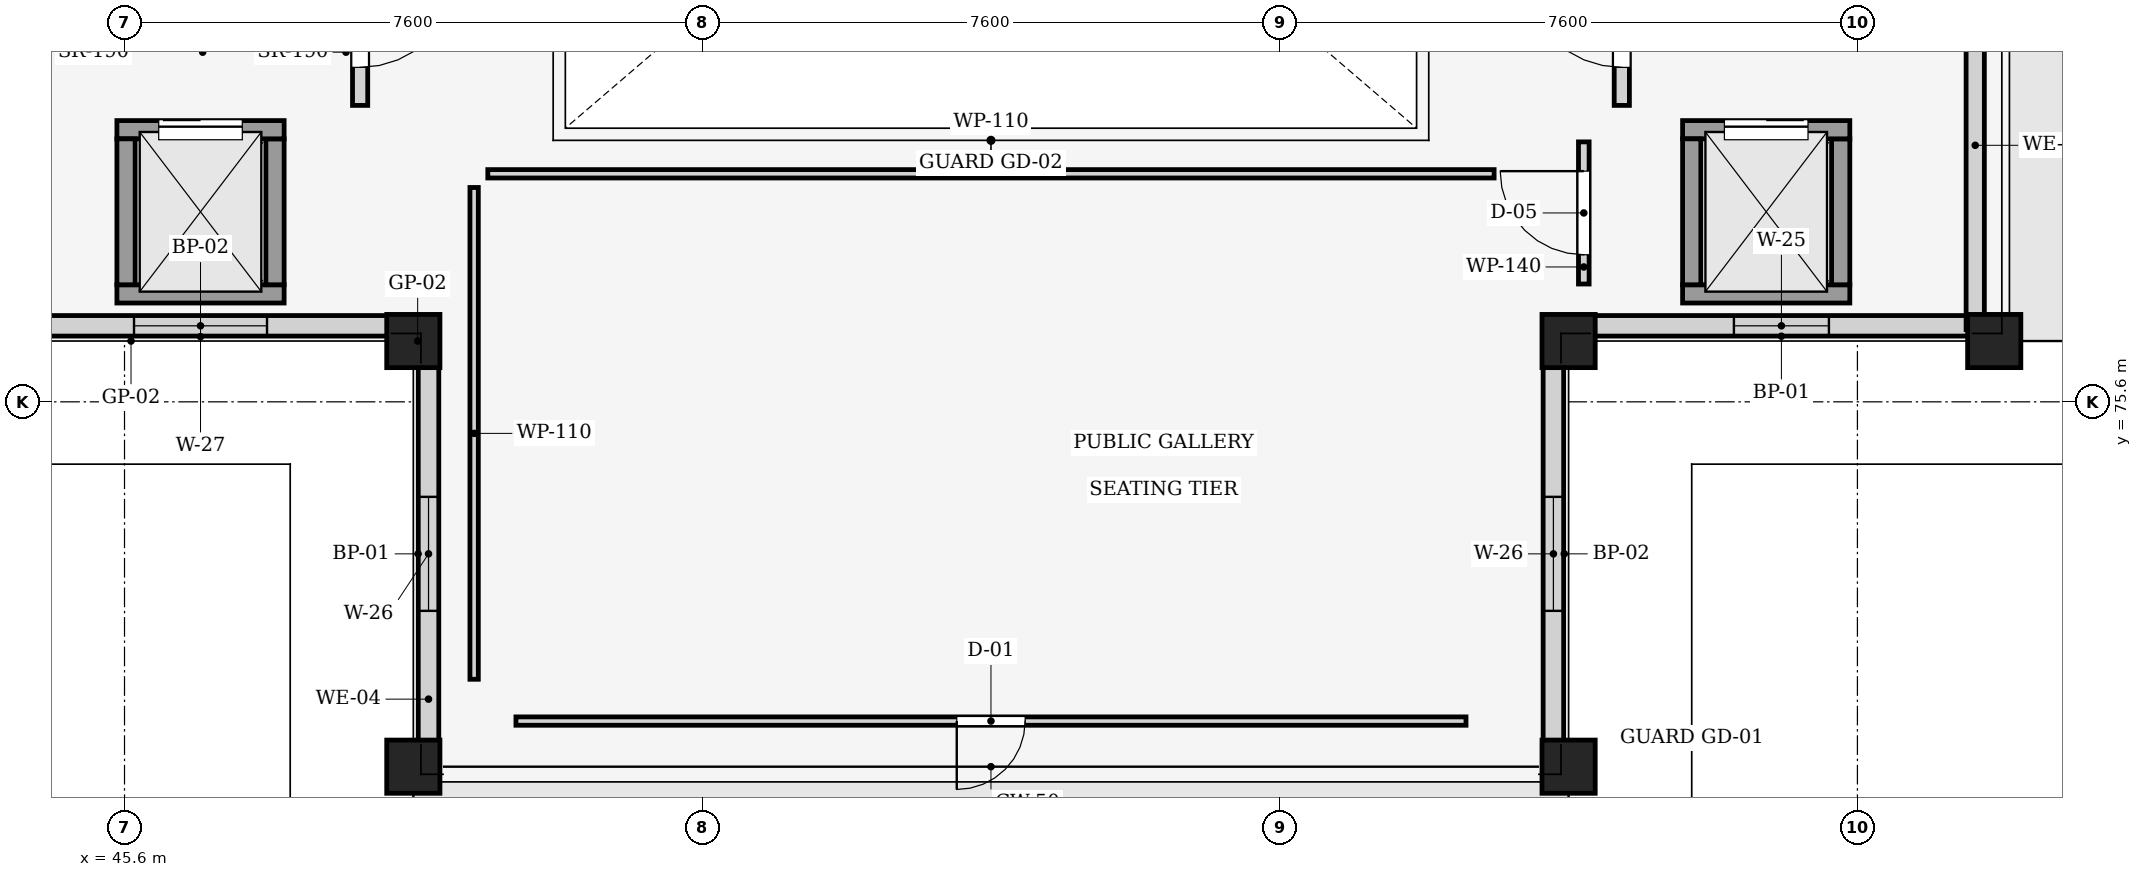
"""IFC4 building model, lengths in metres.
Left out: names, types, materials, properties, quantities, classifications, styles, units other than length and angle.
Written with IfcOpenShell. Run it as: python <this file> out.ifc"""

import sys

from ifc_helpers import new_model, si_unit, direction, frame, frame_2d, origin, origin_2d, place, context, subcontext, project, spatial, rectangle, extrude, element, fill, save


model = new_model("IFC4")
c1 = context("Model", 3, precision=1e-05, world=origin(), true_north=direction((0.0, 1.0)))
c2 = subcontext(c1, "Body", "Model", "MODEL_VIEW")
j1 = project(units=[si_unit("LENGTHUNIT", "METRE"), si_unit("PLANEANGLEUNIT", "RADIAN")], contexts=[c1])
p1 = place(None, origin())
s1 = spatial("IfcSite", under=j1, at=p1, CompositionType="ELEMENT")
p2 = place(p1, origin())
s2 = spatial("IfcBuilding", under=s1, at=p2, CompositionType="ELEMENT")
p3 = place(p2, frame((0.0, 0.0, 29.4)))
s3 = spatial("IfcBuildingStorey", under=s2, at=p3, CompositionType="ELEMENT", Elevation=29.4)
for number, where, z_axis, x_axis in (
    (1, (49.4, 70.8, 0.0), (0.0, 0.0, 1.0), (1.0, 0.0, 0.0)),
    (2, (49.4, 76.4, 0.0), (0.0, 0.0, 1.0), (1.0, 0.0, 0.0)),
    (3, (64.6, 70.8, 0.0), (0.0, 0.0, 1.0), (1.0, 0.0, 0.0)),
    (4, (64.6, 76.4, 0.0), (0.0, 0.0, 1.0), (1.0, 0.0, 0.0)),
):
    element("IfcColumn", number, at=place(p3, frame(where, z_axis=z_axis, x_axis=x_axis)), inside=s3, PredefinedType="COLUMN", context=c2, shape_type="SweptSolid", body=[
        extrude(rectangle(XDim=0.7, YDim=0.7, at=origin_2d()), origin(), (0.0, 0.0, 1.0), 5.0),
    ])
p4 = place(p3, frame((70.2, 76.4, 0.0), z_axis=(0.0, 0.0, 1.0), x_axis=(1.0, 0.0, 0.0)))
e5 = element("IfcColumn", 5, at=p4, inside=s3, PredefinedType="COLUMN", context=c2, shape_type="SweptSolid", body=[
    extrude(rectangle(XDim=0.7, YDim=0.7, at=origin_2d()), origin(), (0.0, 0.0, 1.0), 8.14),
])
p5 = place(p3, frame((49.6, 71.085, 0.0), z_axis=(0.0, 0.0, 1.0), x_axis=(0.0, 1.0, 0.0)))
e6 = element("IfcWall", 6, at=p5, inside=s3, PredefinedType="STANDARD", context=c2, shape_type="SweptSolid", body=[
    extrude(rectangle(XDim=5.03, YDim=0.27, at=frame_2d((2.515, 0.0))), origin(), (0.0, 0.0, 1.0), 4.425),
])
p6 = place(p5, frame((1.765, 0.0, 0.85)))
e7 = element("IfcOpeningElement", 7, at=p6, cuts=e6, PredefinedType="OPENING", context=c2, shape_type="SweptSolid", body=[
    extrude(rectangle(XDim=1.5, YDim=1.85, at=frame_2d((0.75, 0.925))), frame((0.0, 0.145, 0.0), z_axis=(0.0, -1.0, 0.0), x_axis=(1.0, 0.0, 0.0)), (0.0, 0.0, 1.0), 0.29),
])
p7 = place(p3, frame((49.115, 76.6, 0.0), z_axis=(0.0, 0.0, 1.0), x_axis=(-1.0, 0.0, 0.0)))
e8 = element("IfcWall", 8, at=p7, inside=s3, PredefinedType="STANDARD", context=c2, shape_type="SweptSolid", body=[
    extrude(rectangle(XDim=5.03, YDim=0.27, at=frame_2d((2.515, 0.0))), origin(), (0.0, 0.0, 1.0), 4.425),
])
p8 = place(p7, frame((1.64, 0.0, 0.85)))
e9 = element("IfcOpeningElement", 9, at=p8, cuts=e8, PredefinedType="OPENING", context=c2, shape_type="SweptSolid", body=[
    extrude(rectangle(XDim=1.75, YDim=1.85, at=frame_2d((0.875, 0.925))), frame((0.0, 0.145, 0.0), z_axis=(0.0, -1.0, 0.0), x_axis=(1.0, 0.0, 0.0)), (0.0, 0.0, 1.0), 0.29),
])
p9 = place(p3, frame((69.915, 76.6, 0.0), z_axis=(0.0, 0.0, 1.0), x_axis=(-1.0, 0.0, 0.0)))
e10 = element("IfcWall", 10, at=p9, inside=s3, PredefinedType="STANDARD", context=c2, shape_type="SweptSolid", body=[
    extrude(rectangle(XDim=5.03, YDim=0.27, at=frame_2d((2.515, 0.0))), origin(), (0.0, 0.0, 1.0), 4.425),
])
p10 = place(p9, frame((1.89, 0.0, 0.85)))
e11 = element("IfcOpeningElement", 11, at=p10, cuts=e10, PredefinedType="OPENING", context=c2, shape_type="SweptSolid", body=[
    extrude(rectangle(XDim=1.25, YDim=1.85, at=frame_2d((0.625, 0.925))), frame((0.0, 0.145, 0.0), z_axis=(0.0, -1.0, 0.0), x_axis=(1.0, 0.0, 0.0)), (0.0, 0.0, 1.0), 0.29),
])
p11 = place(p3, frame((64.4, 76.115, 0.0), z_axis=(0.0, 0.0, 1.0), x_axis=(0.0, -1.0, 0.0)))
e12 = element("IfcWall", 12, at=p11, inside=s3, PredefinedType="STANDARD", context=c2, shape_type="SweptSolid", body=[
    extrude(rectangle(XDim=5.03, YDim=0.27, at=frame_2d((2.515, 0.0))), origin(), (0.0, 0.0, 1.0), 4.425),
])
p12 = place(p11, frame((1.765, 0.0, 0.85)))
e13 = element("IfcOpeningElement", 13, at=p12, cuts=e12, PredefinedType="OPENING", context=c2, shape_type="SweptSolid", body=[
    extrude(rectangle(XDim=1.5, YDim=1.85, at=frame_2d((0.75, 0.925))), frame((0.0, 0.145, 0.0), z_axis=(0.0, -1.0, 0.0), x_axis=(1.0, 0.0, 0.0)), (0.0, 0.0, 1.0), 0.29),
])
p13 = place(p3, frame((69.95, 81.4, 4.7), z_axis=(0.0, 0.0, 1.0), x_axis=(0.0, -1.0, 0.0)))
e14 = element("IfcWall", 14, at=p13, inside=s3, PredefinedType="STANDARD", context=c2, shape_type="SweptSolid", body=[
    extrude(rectangle(XDim=4.85, YDim=0.24, at=frame_2d((2.425, 0.0))), origin(), (0.0, 0.0, 1.0), 3.8),
])
p14 = place(p3, frame((47.7, 77.02, 0.0), z_axis=(0.0, 0.0, 1.0), x_axis=(-1.0, 0.0, 0.0)))
e15 = element("IfcWall", 15, at=p14, inside=s3, PredefinedType="SHEAR", context=c2, shape_type="SweptSolid", body=[
    extrude(rectangle(XDim=2.2, YDim=0.24, at=frame_2d((1.1, 0.0))), origin(), (0.0, 0.0, 1.0), 4.75),
])
p15 = place(p3, frame((47.58, 79.06, 0.0), z_axis=(0.0, 0.0, 1.0), x_axis=(0.0, -1.0, 0.0)))
e16 = element("IfcWall", 16, at=p15, inside=s3, PredefinedType="SHEAR", context=c2, shape_type="SweptSolid", body=[
    extrude(rectangle(XDim=1.92, YDim=0.24, at=frame_2d((0.96, 0.0))), origin(), (0.0, 0.0, 1.0), 4.75),
])
p16 = place(p3, frame((45.5, 79.18, 0.0), z_axis=(0.0, 0.0, 1.0), x_axis=(1.0, 0.0, 0.0)))
e17 = element("IfcWall", 17, at=p16, inside=s3, PredefinedType="SHEAR", context=c2, shape_type="SweptSolid", body=[
    extrude(rectangle(XDim=2.2, YDim=0.24, at=frame_2d((1.1, 0.0))), origin(), (0.0, 0.0, 1.0), 4.75),
])
p17 = place(p16, frame((0.55, 0.0, 0.0)))
e18 = element("IfcOpeningElement", 18, at=p17, cuts=e17, PredefinedType="OPENING", context=c2, shape_type="SweptSolid", body=[
    extrude(rectangle(XDim=1.1, YDim=2.15, at=frame_2d((0.55, 1.075))), frame((0.0, 0.13, 0.0), z_axis=(0.0, -1.0, 0.0), x_axis=(1.0, 0.0, 0.0)), (0.0, 0.0, 1.0), 0.26),
])
p18 = place(p3, frame((45.62, 77.14, 0.0), z_axis=(0.0, 0.0, 1.0), x_axis=(0.0, 1.0, 0.0)))
e19 = element("IfcWall", 19, at=p18, inside=s3, PredefinedType="SHEAR", context=c2, shape_type="SweptSolid", body=[
    extrude(rectangle(XDim=1.92, YDim=0.24, at=frame_2d((0.96, 0.0))), origin(), (0.0, 0.0, 1.0), 4.75),
])
p19 = place(p3, frame((48.7, 81.8, 0.0), z_axis=(0.0, 0.0, 1.0), x_axis=(0.0, -1.0, 0.0)))
e20 = element("IfcWall", 20, at=p19, inside=s3, PredefinedType="PARTITIONING", context=c2, shape_type="SweptSolid", body=[
    extrude(rectangle(XDim=2.3, YDim=0.2, at=frame_2d((1.15, 0.0))), origin(), (0.0, 0.0, 1.0), 2.9),
])
p20 = place(p19, frame((0.5, 0.0, 0.0)))
e21 = element("IfcOpeningElement", 21, at=p20, cuts=e20, PredefinedType="OPENING", context=c2, shape_type="SweptSolid", body=[
    extrude(rectangle(XDim=1.3, YDim=2.2, at=frame_2d((0.65, 1.1))), frame((0.0, 0.11, 0.0), z_axis=(0.0, -1.0, 0.0), x_axis=(1.0, 0.0, 0.0)), (0.0, 0.0, 1.0), 0.22),
])
p21 = place(p3, frame((68.3, 77.02, 0.0), z_axis=(0.0, 0.0, 1.0), x_axis=(-1.0, 0.0, 0.0)))
e22 = element("IfcWall", 22, at=p21, inside=s3, PredefinedType="SHEAR", context=c2, shape_type="SweptSolid", body=[
    extrude(rectangle(XDim=2.2, YDim=0.24, at=frame_2d((1.1, 0.0))), origin(), (0.0, 0.0, 1.0), 4.75),
])
p22 = place(p3, frame((68.18, 79.06, 0.0), z_axis=(0.0, 0.0, 1.0), x_axis=(0.0, -1.0, 0.0)))
e23 = element("IfcWall", 23, at=p22, inside=s3, PredefinedType="SHEAR", context=c2, shape_type="SweptSolid", body=[
    extrude(rectangle(XDim=1.92, YDim=0.24, at=frame_2d((0.96, 0.0))), origin(), (0.0, 0.0, 1.0), 4.75),
])
p23 = place(p3, frame((66.1, 79.18, 0.0), z_axis=(0.0, 0.0, 1.0), x_axis=(1.0, 0.0, 0.0)))
e24 = element("IfcWall", 24, at=p23, inside=s3, PredefinedType="SHEAR", context=c2, shape_type="SweptSolid", body=[
    extrude(rectangle(XDim=2.2, YDim=0.24, at=frame_2d((1.1, 0.0))), origin(), (0.0, 0.0, 1.0), 4.75),
])
p24 = place(p23, frame((0.55, 0.0, 0.0)))
e25 = element("IfcOpeningElement", 25, at=p24, cuts=e24, PredefinedType="OPENING", context=c2, shape_type="SweptSolid", body=[
    extrude(rectangle(XDim=1.1, YDim=2.15, at=frame_2d((0.55, 1.075))), frame((0.0, 0.13, 0.0), z_axis=(0.0, -1.0, 0.0), x_axis=(1.0, 0.0, 0.0)), (0.0, 0.0, 1.0), 0.26),
])
p25 = place(p3, frame((66.22, 77.14, 0.0), z_axis=(0.0, 0.0, 1.0), x_axis=(0.0, 1.0, 0.0)))
e26 = element("IfcWall", 26, at=p25, inside=s3, PredefinedType="SHEAR", context=c2, shape_type="SweptSolid", body=[
    extrude(rectangle(XDim=1.92, YDim=0.24, at=frame_2d((0.96, 0.0))), origin(), (0.0, 0.0, 1.0), 4.75),
])
p26 = place(p3, frame((65.3, 79.5, 0.0), z_axis=(0.0, 0.0, 1.0), x_axis=(0.0, 1.0, 0.0)))
e27 = element("IfcWall", 27, at=p26, inside=s3, PredefinedType="PARTITIONING", context=c2, shape_type="SweptSolid", body=[
    extrude(rectangle(XDim=2.3, YDim=0.2, at=frame_2d((1.15, 0.0))), origin(), (0.0, 0.0, 1.0), 2.9),
])
p27 = place(p26, frame((0.5, 0.0, 0.0)))
e28 = element("IfcOpeningElement", 28, at=p27, cuts=e27, PredefinedType="OPENING", context=c2, shape_type="SweptSolid", body=[
    extrude(rectangle(XDim=1.3, YDim=2.2, at=frame_2d((0.65, 1.1))), frame((0.0, 0.11, 0.0), z_axis=(0.0, -1.0, 0.0), x_axis=(1.0, 0.0, 0.0)), (0.0, 0.0, 1.0), 0.22),
])
p28 = place(p3, frame((50.2, 71.95, 0.0), z_axis=(0.0, 0.0, 1.0), x_axis=(0.0, 1.0, 0.0)))
e29 = element("IfcWall", 29, at=p28, inside=s3, PredefinedType="PARTITIONING", context=c2, shape_type="SweptSolid", body=[
    extrude(rectangle(XDim=6.47, YDim=0.11, at=frame_2d((3.235, 0.0))), origin(), (0.0, 0.0, 1.0), 4.57),
])
p29 = place(p3, frame((50.38, 78.6, 0.0), z_axis=(0.0, 0.0, 1.0), x_axis=(1.0, 0.0, 0.0)))
e30 = element("IfcWall", 30, at=p29, inside=s3, PredefinedType="PARTITIONING", context=c2, shape_type="SweptSolid", body=[
    extrude(rectangle(XDim=13.24, YDim=0.11, at=frame_2d((6.62, 0.0))), origin(), (0.0, 0.0, 1.0), 4.57),
])
p30 = place(p3, frame((63.25, 71.4, 0.0), z_axis=(0.0, 0.0, 1.0), x_axis=(-1.0, 0.0, 0.0)))
e31 = element("IfcWall", 31, at=p30, inside=s3, PredefinedType="PARTITIONING", context=c2, shape_type="SweptSolid", body=[
    extrude(rectangle(XDim=12.5, YDim=0.11, at=frame_2d((6.25, 0.0))), origin(), (0.0, 0.0, 1.0), 4.57),
])
p31 = place(p30, frame((5.8, 0.0, 0.0)))
e32 = element("IfcOpeningElement", 32, at=p31, cuts=e31, PredefinedType="OPENING", context=c2, shape_type="SweptSolid", body=[
    extrude(rectangle(XDim=0.9, YDim=2.1, at=frame_2d((0.45, 1.05))), frame((0.0, 0.065, 0.0), z_axis=(0.0, -1.0, 0.0), x_axis=(1.0, 0.0, 0.0)), (0.0, 0.0, 1.0), 0.13),
])
p32 = place(p3, frame((64.8, 77.15, 0.0), z_axis=(0.0, 0.0, 1.0), x_axis=(0.0, 1.0, 0.0)))
e33 = element("IfcWall", 33, at=p32, inside=s3, PredefinedType="PARTITIONING", context=c2, shape_type="SweptSolid", body=[
    extrude(rectangle(XDim=1.87, YDim=0.14, at=frame_2d((0.935, 0.0))), origin(), (0.0, 0.0, 1.0), 4.57),
])
p33 = place(p32, frame((0.385, 0.0, 0.0)))
e34 = element("IfcOpeningElement", 34, at=p33, cuts=e33, PredefinedType="OPENING", context=c2, shape_type="SweptSolid", body=[
    extrude(rectangle(XDim=1.1, YDim=2.1, at=frame_2d((0.55, 1.05))), frame((0.0, 0.08, 0.0), z_axis=(0.0, -1.0, 0.0), x_axis=(1.0, 0.0, 0.0)), (0.0, 0.0, 1.0), 0.16),
])
p34 = place(p6, origin())
e35 = element("IfcWindow", 35, at=p34, inside=s3, PartitioningType="SINGLE_PANEL", PredefinedType="WINDOW", context=c2, shape_type="SweptSolid", body=[
    extrude(rectangle(XDim=1.5, YDim=1.85, at=frame_2d((0.75, 0.925))), frame((0.0, 0.03, 0.0), z_axis=(0.0, -1.0, 0.0), x_axis=(1.0, 0.0, 0.0)), (0.0, 0.0, 1.0), 0.06),
])
fill(e7, e35)
p35 = place(p8, origin())
e36 = element("IfcWindow", 36, at=p35, inside=s3, PartitioningType="SINGLE_PANEL", PredefinedType="WINDOW", context=c2, shape_type="SweptSolid", body=[
    extrude(rectangle(XDim=1.75, YDim=1.85, at=frame_2d((0.875, 0.925))), frame((0.0, 0.03, 0.0), z_axis=(0.0, -1.0, 0.0), x_axis=(1.0, 0.0, 0.0)), (0.0, 0.0, 1.0), 0.06),
])
fill(e9, e36)
p36 = place(p10, origin())
e37 = element("IfcWindow", 37, at=p36, inside=s3, PartitioningType="SINGLE_PANEL", PredefinedType="WINDOW", context=c2, shape_type="SweptSolid", body=[
    extrude(rectangle(XDim=1.25, YDim=1.85, at=frame_2d((0.625, 0.925))), frame((0.0, 0.03, 0.0), z_axis=(0.0, -1.0, 0.0), x_axis=(1.0, 0.0, 0.0)), (0.0, 0.0, 1.0), 0.06),
])
fill(e11, e37)
p37 = place(p12, origin())
e38 = element("IfcWindow", 38, at=p37, inside=s3, PartitioningType="SINGLE_PANEL", PredefinedType="WINDOW", context=c2, shape_type="SweptSolid", body=[
    extrude(rectangle(XDim=1.5, YDim=1.85, at=frame_2d((0.75, 0.925))), frame((0.0, 0.03, 0.0), z_axis=(0.0, -1.0, 0.0), x_axis=(1.0, 0.0, 0.0)), (0.0, 0.0, 1.0), 0.06),
])
fill(e13, e38)
p38 = place(p17, origin())
e39 = element("IfcDoor", 39, at=p38, inside=s3, OperationType="SLIDING_TO_LEFT", PredefinedType="DOOR", context=c2, shape_type="SweptSolid", body=[
    extrude(rectangle(XDim=1.1, YDim=2.15, at=frame_2d((0.55, 1.075))), frame((0.0, 0.025, 0.0), z_axis=(0.0, -1.0, 0.0), x_axis=(1.0, 0.0, 0.0)), (0.0, 0.0, 1.0), 0.05),
])
fill(e18, e39)
p39 = place(p20, origin())
e40 = element("IfcDoor", 40, at=p39, inside=s3, OperationType="SINGLE_SWING_LEFT", PredefinedType="DOOR", context=c2, shape_type="SweptSolid", body=[
    extrude(rectangle(XDim=1.3, YDim=2.2, at=frame_2d((0.65, 1.1))), frame((0.0, 0.025, 0.0), z_axis=(0.0, -1.0, 0.0), x_axis=(1.0, 0.0, 0.0)), (0.0, 0.0, 1.0), 0.05),
])
fill(e21, e40)
p40 = place(p24, origin())
e41 = element("IfcDoor", 41, at=p40, inside=s3, OperationType="SLIDING_TO_RIGHT", PredefinedType="DOOR", context=c2, shape_type="SweptSolid", body=[
    extrude(rectangle(XDim=1.1, YDim=2.15, at=frame_2d((0.55, 1.075))), frame((0.0, 0.025, 0.0), z_axis=(0.0, -1.0, 0.0), x_axis=(1.0, 0.0, 0.0)), (0.0, 0.0, 1.0), 0.05),
])
fill(e25, e41)
p41 = place(p27, origin())
e42 = element("IfcDoor", 42, at=p41, inside=s3, OperationType="SINGLE_SWING_RIGHT", PredefinedType="DOOR", context=c2, shape_type="SweptSolid", body=[
    extrude(rectangle(XDim=1.3, YDim=2.2, at=frame_2d((0.65, 1.1))), frame((0.0, 0.025, 0.0), z_axis=(0.0, -1.0, 0.0), x_axis=(1.0, 0.0, 0.0)), (0.0, 0.0, 1.0), 0.05),
])
fill(e28, e42)
p42 = place(p31, origin())
e43 = element("IfcDoor", 43, at=p42, inside=s3, OperationType="SINGLE_SWING_RIGHT", PredefinedType="DOOR", context=c2, shape_type="SweptSolid", body=[
    extrude(rectangle(XDim=0.9, YDim=2.1, at=frame_2d((0.45, 1.05))), frame((0.0, 0.025, 0.0), z_axis=(0.0, -1.0, 0.0), x_axis=(1.0, 0.0, 0.0)), (0.0, 0.0, 1.0), 0.05),
])
fill(e32, e43)
p43 = place(p33, origin())
e44 = element("IfcDoor", 44, at=p43, inside=s3, OperationType="SINGLE_SWING_RIGHT", PredefinedType="DOOR", context=c2, shape_type="SweptSolid", body=[
    extrude(rectangle(XDim=1.1, YDim=2.1, at=frame_2d((0.55, 1.05))), frame((0.0, 0.025, 0.0), z_axis=(0.0, -1.0, 0.0), x_axis=(1.0, 0.0, 0.0)), (0.0, 0.0, 1.0), 0.05),
])
fill(e34, e44)
save(model, sys.argv[1])
